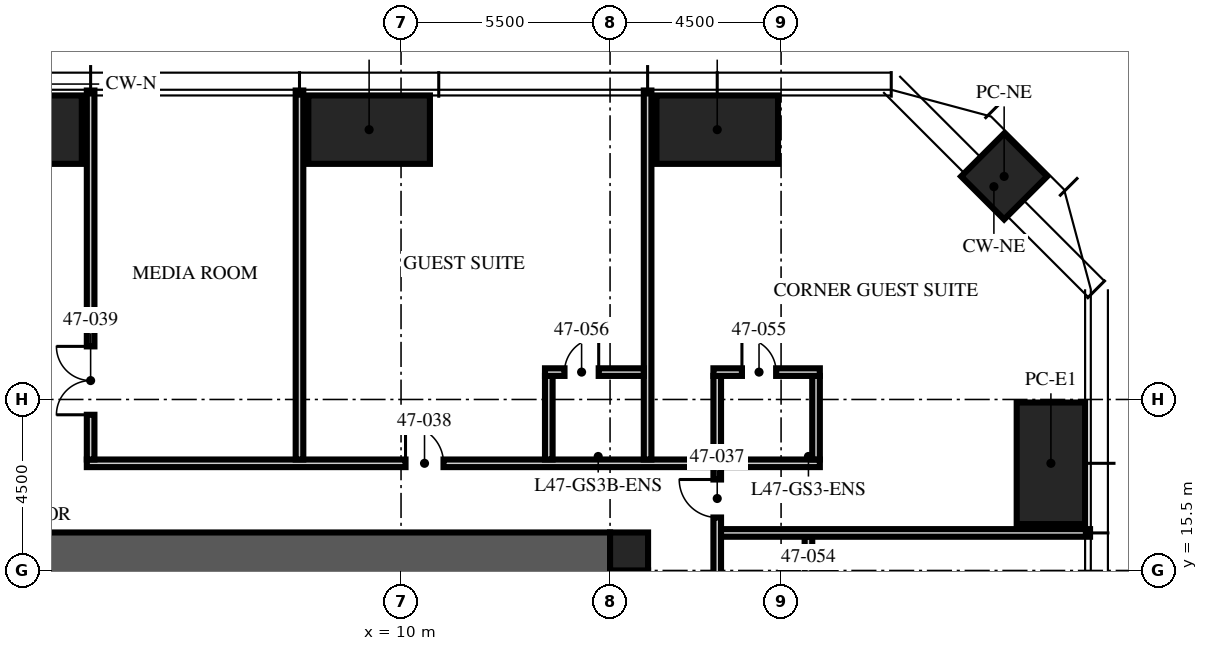
"""IFC4 building model, lengths in metres.
Left out: names, types, materials, properties, quantities, classifications, styles, units other than length and angle.
Written with IfcOpenShell. Run it as: python <this file> out.ifc"""

import sys

from ifc_helpers import new_model, si_unit, direction, frame, frame_2d, origin, origin_2d, place, context, subcontext, project, spatial, rectangle, hollow_rectangle, extrude, element, fill, save


model = new_model("IFC4")
c1 = context("Model", 3, precision=1e-05, world=origin(), true_north=direction((0.0, 1.0)))
c2 = subcontext(c1, "Body", "Model", "MODEL_VIEW")
j1 = project(units=[si_unit("LENGTHUNIT", "METRE"), si_unit("PLANEANGLEUNIT", "RADIAN")], contexts=[c1])
p1 = place(None, origin())
s1 = spatial("IfcSite", under=j1, at=p1, CompositionType="ELEMENT")
p2 = place(p1, origin())
s2 = spatial("IfcBuilding", under=s1, at=p2, CompositionType="ELEMENT")
p3 = place(p2, frame((0.0, 0.0, 186.0)))
s3 = spatial("IfcBuildingStorey", under=s2, at=p3, CompositionType="ELEMENT", Elevation=186.0)
p4 = place(p3, frame((15.5, -15.5, -0.3), z_axis=(0.0, 0.0, 1.0), x_axis=(0.0, 1.0, 0.0)))
e1 = element("IfcWall", 1, at=p4, inside=s3, PredefinedType="SHEAR", context=c2, shape_type="SweptSolid", body=[
    extrude(rectangle(XDim=31.0, YDim=2.0, at=frame_2d((15.5, 0.0))), origin(), (0.0, 0.0, 1.0), 5.95),
])
p5 = place(p4, frame((6.5, 0.0, 0.3)))
e2 = element("IfcOpeningElement", 2, at=p5, cuts=e1, PredefinedType="OPENING", context=c2, shape_type="SweptSolid", body=[
    extrude(rectangle(XDim=1.2, YDim=2.1, at=frame_2d((0.6, 1.05))), frame((0.0, 1.01, 0.0), z_axis=(0.0, -1.0, 0.0), x_axis=(1.0, 0.0, 0.0)), (0.0, 0.0, 1.0), 2.02),
])
p6 = place(p4, frame((23.0, 0.0, 0.3)))
e3 = element("IfcOpeningElement", 3, at=p6, cuts=e1, PredefinedType="OPENING", context=c2, shape_type="SweptSolid", body=[
    extrude(rectangle(XDim=1.8, YDim=2.1, at=frame_2d((0.9, 1.05))), frame((0.0, 1.01, 0.0), z_axis=(0.0, -1.0, 0.0), x_axis=(1.0, 0.0, 0.0)), (0.0, 0.0, 1.0), 2.02),
])
p7 = place(p3, frame((-15.5, 15.5, -0.3), z_axis=(0.0, 0.0, 1.0), x_axis=(1.0, 0.0, 0.0)))
e4 = element("IfcWall", 4, at=p7, inside=s3, PredefinedType="SHEAR", context=c2, shape_type="SweptSolid", body=[
    extrude(rectangle(XDim=31.0, YDim=2.0, at=frame_2d((15.5, 0.0))), origin(), (0.0, 0.0, 1.0), 5.95),
])
p8 = place(p7, frame((5.0, 0.0, 0.3)))
e5 = element("IfcOpeningElement", 5, at=p8, cuts=e4, PredefinedType="OPENING", context=c2, shape_type="SweptSolid", body=[
    extrude(rectangle(XDim=1.0, YDim=2.1, at=frame_2d((0.5, 1.05))), frame((0.0, 1.01, 0.0), z_axis=(0.0, -1.0, 0.0), x_axis=(1.0, 0.0, 0.0)), (0.0, 0.0, 1.0), 2.02),
])
p9 = place(p3, frame((16.0, 16.0, -0.3), z_axis=(0.0, 0.0, 1.0), x_axis=(1.0, 0.0, 0.0)))
e6 = element("IfcColumn", 6, at=p9, inside=s3, PredefinedType="COLUMN", context=c2, shape_type="SweptSolid", body=[
    extrude(rectangle(XDim=1.0, YDim=1.0, at=origin_2d()), origin(), (0.0, 0.0, 1.0), 5.95),
])
p10 = place(p3, frame((0.0, 27.1, 0.0), z_axis=(0.0, 0.0, 1.0), x_axis=(1.0, 0.0, 0.0)))
e7 = element("IfcColumn", 7, at=p10, inside=s3, PredefinedType="COLUMN", context=c2, shape_type="SweptSolid", body=[
    extrude(hollow_rectangle(XDim=3.2, YDim=1.8, WallThickness=0.2, at=origin_2d()), origin(), (0.0, 0.0, 1.0), 5.03),
])
p11 = place(p3, frame((9.16, 27.1, 0.0), z_axis=(0.0, 0.0, 1.0), x_axis=(1.0, 0.0, 0.0)))
e8 = element("IfcColumn", 8, at=p11, inside=s3, PredefinedType="COLUMN", context=c2, shape_type="SweptSolid", body=[
    extrude(hollow_rectangle(XDim=3.2, YDim=1.8, WallThickness=0.2, at=origin_2d()), origin(), (0.0, 0.0, 1.0), 4.87),
])
for number, where, z_axis, x_axis in (
    (9, (18.32, 27.1, 0.0), (0.0, 0.0, 1.0), (1.0, 0.0, 0.0)),
    (10, (27.1, 18.32, 0.0), (0.0, 0.0, 1.0), (0.0, 1.0, 0.0)),
):
    element("IfcColumn", number, at=place(p3, frame(where, z_axis=z_axis, x_axis=x_axis)), inside=s3, PredefinedType="COLUMN", context=c2, shape_type="SweptSolid", body=[
        extrude(hollow_rectangle(XDim=3.2, YDim=1.8, WallThickness=0.2, at=origin_2d()), origin(), (0.0, 0.0, 1.0), 4.72),
    ])
p12 = place(p3, frame((25.87, 25.87, 0.0), z_axis=(0.0, 0.0, 1.0), x_axis=(0.707106781187, -0.707106781187, 0.0)))
e11 = element("IfcColumn", 11, at=p12, inside=s3, PredefinedType="COLUMN", context=c2, shape_type="SweptSolid", body=[
    extrude(hollow_rectangle(XDim=1.6, YDim=1.6, WallThickness=0.1, at=origin_2d()), origin(), (0.0, 0.0, 1.0), 4.99),
])
p13 = place(p3, frame((18.32, -18.22, 0.0), z_axis=(0.0, 0.0, 1.0), x_axis=(0.0, 1.0, 0.0)))
e12 = element("IfcWall", 12, at=p13, inside=s3, PredefinedType="SOLIDWALL", context=c2, shape_type="SweptSolid", body=[
    extrude(rectangle(XDim=36.44, YDim=0.2, at=frame_2d((18.22, 0.0))), origin(), (0.0, 0.0, 1.0), 4.45),
])
p14 = place(p13, frame((7.102, 0.0, 0.0)))
e13 = element("IfcOpeningElement", 13, at=p14, cuts=e12, PredefinedType="OPENING", context=c2, shape_type="SweptSolid", body=[
    extrude(rectangle(XDim=1.0, YDim=2.1, at=frame_2d((0.5, 1.05))), frame((0.0, 0.11, 0.0), z_axis=(0.0, -1.0, 0.0), x_axis=(1.0, 0.0, 0.0)), (0.0, 0.0, 1.0), 0.22),
])
p15 = place(p13, frame((16.262, 0.0, 0.0)))
e14 = element("IfcOpeningElement", 14, at=p15, cuts=e12, PredefinedType="OPENING", context=c2, shape_type="SweptSolid", body=[
    extrude(rectangle(XDim=1.0, YDim=2.1, at=frame_2d((0.5, 1.05))), frame((0.0, 0.11, 0.0), z_axis=(0.0, -1.0, 0.0), x_axis=(1.0, 0.0, 0.0)), (0.0, 0.0, 1.0), 0.22),
])
p16 = place(p13, frame((23.59, 0.0, 0.0)))
e15 = element("IfcOpeningElement", 15, at=p16, cuts=e12, PredefinedType="OPENING", context=c2, shape_type="SweptSolid", body=[
    extrude(rectangle(XDim=1.0, YDim=2.1, at=frame_2d((0.5, 1.05))), frame((0.0, 0.11, 0.0), z_axis=(0.0, -1.0, 0.0), x_axis=(1.0, 0.0, 0.0)), (0.0, 0.0, 1.0), 0.22),
])
p17 = place(p13, frame((28.318, 0.0, 0.0)))
e16 = element("IfcOpeningElement", 16, at=p17, cuts=e12, PredefinedType="OPENING", context=c2, shape_type="SweptSolid", body=[
    extrude(rectangle(XDim=1.0, YDim=2.1, at=frame_2d((0.5, 1.05))), frame((0.0, 0.11, 0.0), z_axis=(0.0, -1.0, 0.0), x_axis=(1.0, 0.0, 0.0)), (0.0, 0.0, 1.0), 0.22),
])
p18 = place(p13, frame((35.114, 0.0, 0.0)))
e17 = element("IfcOpeningElement", 17, at=p18, cuts=e12, PredefinedType="OPENING", context=c2, shape_type="SweptSolid", body=[
    extrude(rectangle(XDim=1.0, YDim=2.1, at=frame_2d((0.5, 1.05))), frame((0.0, 0.11, 0.0), z_axis=(0.0, -1.0, 0.0), x_axis=(1.0, 0.0, 0.0)), (0.0, 0.0, 1.0), 0.22),
])
p19 = place(p3, frame((20.72, 13.988, 0.0), z_axis=(0.0, 0.0, 1.0), x_axis=(0.0, 1.0, 0.0)))
e18 = element("IfcWall", 18, at=p19, inside=s3, PredefinedType="SOLIDWALL", context=c2, shape_type="SweptSolid", body=[
    extrude(rectangle(XDim=2.4, YDim=0.2, at=frame_2d((1.2, 0.0))), origin(), (0.0, 0.0, 1.0), 5.65),
])
p20 = place(p19, frame((0.313, 0.0, 0.0)))
e19 = element("IfcOpeningElement", 19, at=p20, cuts=e18, PredefinedType="OPENING", context=c2, shape_type="SweptSolid", body=[
    extrude(rectangle(XDim=0.9, YDim=2.1, at=frame_2d((0.45, 1.05))), frame((0.0, 0.11, 0.0), z_axis=(0.0, -1.0, 0.0), x_axis=(1.0, 0.0, 0.0)), (0.0, 0.0, 1.0), 0.22),
])
p21 = place(p3, frame((18.42, 16.488, 0.0), z_axis=(0.0, 0.0, 1.0), x_axis=(1.0, 0.0, 0.0)))
e20 = element("IfcWall", 20, at=p21, inside=s3, PredefinedType="SOLIDWALL", context=c2, shape_type="SweptSolid", body=[
    extrude(rectangle(XDim=9.71, YDim=0.2, at=frame_2d((4.855, 0.0))), origin(), (0.0, 0.0, 1.0), 4.95),
])
p22 = place(p3, frame((1.732, 18.32, 0.0), z_axis=(0.0, 0.0, 1.0), x_axis=(1.0, 0.0, 0.0)))
e21 = element("IfcWall", 21, at=p22, inside=s3, PredefinedType="SOLIDWALL", context=c2, shape_type="SweptSolid", body=[
    extrude(rectangle(XDim=19.288, YDim=0.2, at=frame_2d((9.644, 0.0))), origin(), (0.0, 0.0, 1.0), 4.45),
])
p23 = place(p22, frame((8.386, 0.0, 0.0)))
e22 = element("IfcOpeningElement", 22, at=p23, cuts=e21, PredefinedType="OPENING", context=c2, shape_type="SweptSolid", body=[
    extrude(rectangle(XDim=1.0, YDim=2.1, at=frame_2d((0.5, 1.05))), frame((0.0, 0.11, 0.0), z_axis=(0.0, -1.0, 0.0), x_axis=(1.0, 0.0, 0.0)), (0.0, 0.0, 1.0), 0.22),
])
p24 = place(p3, frame((1.832, 18.42, 0.0), z_axis=(0.0, 0.0, 1.0), x_axis=(0.0, 1.0, 0.0)))
e23 = element("IfcWall", 23, at=p24, inside=s3, PredefinedType="SOLIDWALL", context=c2, shape_type="SweptSolid", body=[
    extrude(rectangle(XDim=9.71, YDim=0.2, at=frame_2d((4.855, 0.0))), origin(), (0.0, 0.0, 1.0), 4.95),
])
p25 = place(p24, frame((1.177, 0.0, 0.0)))
e24 = element("IfcOpeningElement", 24, at=p25, cuts=e23, PredefinedType="OPENING", context=c2, shape_type="SweptSolid", body=[
    extrude(rectangle(XDim=1.8, YDim=2.4, at=frame_2d((0.9, 1.2))), frame((0.0, 0.11, 0.0), z_axis=(0.0, -1.0, 0.0), x_axis=(1.0, 0.0, 0.0)), (0.0, 0.0, 1.0), 0.22),
])
p26 = place(p3, frame((7.328, 18.42, 0.0), z_axis=(0.0, 0.0, 1.0), x_axis=(0.0, 1.0, 0.0)))
e25 = element("IfcWall", 25, at=p26, inside=s3, PredefinedType="SOLIDWALL", context=c2, shape_type="SweptSolid", body=[
    extrude(rectangle(XDim=9.71, YDim=0.2, at=frame_2d((4.855, 0.0))), origin(), (0.0, 0.0, 1.0), 4.95),
])
p27 = place(p3, frame((13.888, 18.42, 0.0), z_axis=(0.0, 0.0, 1.0), x_axis=(0.0, 1.0, 0.0)))
e26 = element("IfcWall", 26, at=p27, inside=s3, PredefinedType="SOLIDWALL", context=c2, shape_type="SweptSolid", body=[
    extrude(rectangle(XDim=2.2, YDim=0.2, at=frame_2d((1.1, 0.0))), origin(), (0.0, 0.0, 1.0), 4.45),
])
p28 = place(p3, frame((16.488, 18.42, 0.0), z_axis=(0.0, 0.0, 1.0), x_axis=(0.0, 1.0, 0.0)))
e27 = element("IfcWall", 27, at=p28, inside=s3, PredefinedType="SOLIDWALL", context=c2, shape_type="SweptSolid", body=[
    extrude(rectangle(XDim=9.71, YDim=0.2, at=frame_2d((4.855, 0.0))), origin(), (0.0, 0.0, 1.0), 4.95),
])
for number, where, z_axis, x_axis in (
    (28, (18.32, 18.42, 0.0), (0.0, 0.0, 1.0), (0.0, 1.0, 0.0)),
    (29, (20.92, 18.42, 0.0), (0.0, 0.0, 1.0), (0.0, 1.0, 0.0)),
):
    element("IfcWall", number, at=place(p3, frame(where, z_axis=z_axis, x_axis=x_axis)), inside=s3, PredefinedType="SOLIDWALL", context=c2, shape_type="SweptSolid", body=[
        extrude(rectangle(XDim=2.2, YDim=0.2, at=frame_2d((1.1, 0.0))), origin(), (0.0, 0.0, 1.0), 4.45),
    ])
p29 = place(p3, frame((13.788, 20.72, 0.0), z_axis=(0.0, 0.0, 1.0), x_axis=(1.0, 0.0, 0.0)))
e30 = element("IfcWall", 30, at=p29, inside=s3, PredefinedType="SOLIDWALL", context=c2, shape_type="SweptSolid", body=[
    extrude(rectangle(XDim=2.6, YDim=0.2, at=frame_2d((1.3, 0.0))), origin(), (0.0, 0.0, 1.0), 4.45),
])
p30 = place(p29, frame((0.513, 0.0, 0.0)))
e31 = element("IfcOpeningElement", 31, at=p30, cuts=e30, PredefinedType="OPENING", context=c2, shape_type="SweptSolid", body=[
    extrude(rectangle(XDim=0.9, YDim=2.1, at=frame_2d((0.45, 1.05))), frame((0.0, 0.11, 0.0), z_axis=(0.0, -1.0, 0.0), x_axis=(1.0, 0.0, 0.0)), (0.0, 0.0, 1.0), 0.22),
])
p31 = place(p3, frame((18.22, 20.72, 0.0), z_axis=(0.0, 0.0, 1.0), x_axis=(1.0, 0.0, 0.0)))
e32 = element("IfcWall", 32, at=p31, inside=s3, PredefinedType="SOLIDWALL", context=c2, shape_type="SweptSolid", body=[
    extrude(rectangle(XDim=2.8, YDim=0.2, at=frame_2d((1.4, 0.0))), origin(), (0.0, 0.0, 1.0), 4.45),
])
p32 = place(p31, frame((0.75, 0.0, 0.0)))
e33 = element("IfcOpeningElement", 33, at=p32, cuts=e32, PredefinedType="OPENING", context=c2, shape_type="SweptSolid", body=[
    extrude(rectangle(XDim=0.9, YDim=2.1, at=frame_2d((0.45, 1.05))), frame((0.0, 0.11, 0.0), z_axis=(0.0, -1.0, 0.0), x_axis=(1.0, 0.0, 0.0)), (0.0, 0.0, 1.0), 0.22),
])
p33 = place(p18, origin())
e34 = element("IfcDoor", 34, at=p33, inside=s3, OperationType="SINGLE_SWING_RIGHT", PredefinedType="DOOR", context=c2, shape_type="SweptSolid", body=[
    extrude(rectangle(XDim=1.0, YDim=2.1, at=frame_2d((0.5, 1.05))), frame((0.0, 0.025, 0.0), z_axis=(0.0, -1.0, 0.0), x_axis=(1.0, 0.0, 0.0)), (0.0, 0.0, 1.0), 0.05),
])
fill(e17, e34)
p34 = place(p23, origin())
e35 = element("IfcDoor", 35, at=p34, inside=s3, OperationType="SINGLE_SWING_LEFT", PredefinedType="DOOR", context=c2, shape_type="SweptSolid", body=[
    extrude(rectangle(XDim=1.0, YDim=2.1, at=frame_2d((0.5, 1.05))), frame((0.0, 0.025, 0.0), z_axis=(0.0, -1.0, 0.0), x_axis=(1.0, 0.0, 0.0)), (0.0, 0.0, 1.0), 0.05),
])
fill(e22, e35)
p35 = place(p25, origin())
e36 = element("IfcDoor", 36, at=p35, inside=s3, OperationType="DOUBLE_DOOR_SINGLE_SWING", PredefinedType="DOOR", context=c2, shape_type="SweptSolid", body=[
    extrude(rectangle(XDim=1.8, YDim=2.4, at=frame_2d((0.9, 1.2))), frame((0.0, 0.025, 0.0), z_axis=(0.0, -1.0, 0.0), x_axis=(1.0, 0.0, 0.0)), (0.0, 0.0, 1.0), 0.05),
])
fill(e24, e36)
p36 = place(p32, origin())
e37 = element("IfcDoor", 37, at=p36, inside=s3, OperationType="SINGLE_SWING_LEFT", PredefinedType="DOOR", context=c2, shape_type="SweptSolid", body=[
    extrude(rectangle(XDim=0.9, YDim=2.1, at=frame_2d((0.45, 1.05))), frame((0.0, 0.025, 0.0), z_axis=(0.0, -1.0, 0.0), x_axis=(1.0, 0.0, 0.0)), (0.0, 0.0, 1.0), 0.05),
])
fill(e33, e37)
p37 = place(p30, origin())
e38 = element("IfcDoor", 38, at=p37, inside=s3, OperationType="SINGLE_SWING_RIGHT", PredefinedType="DOOR", context=c2, shape_type="SweptSolid", body=[
    extrude(rectangle(XDim=0.9, YDim=2.1, at=frame_2d((0.45, 1.05))), frame((0.0, 0.025, 0.0), z_axis=(0.0, -1.0, 0.0), x_axis=(1.0, 0.0, 0.0)), (0.0, 0.0, 1.0), 0.05),
])
fill(e31, e38)
save(model, sys.argv[1])
